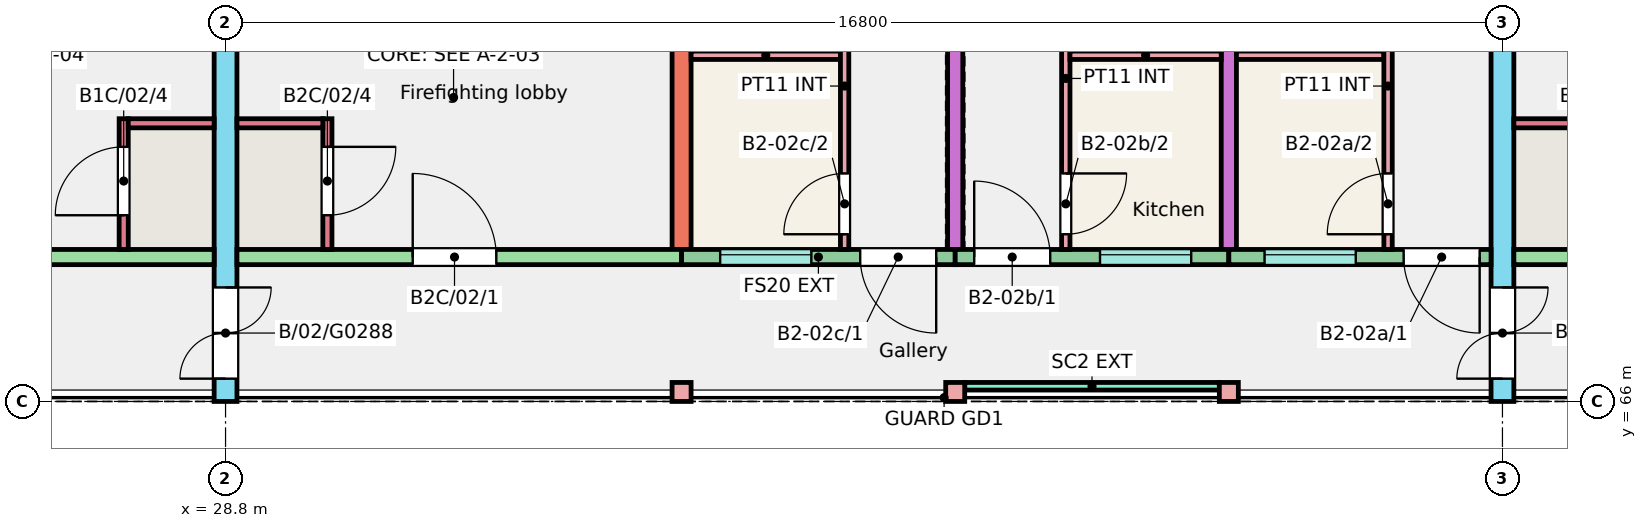
"""IFC4 building model, lengths in metres.
Left out: names, types, materials, properties, quantities, classifications, styles, units other than length and angle.
Written with IfcOpenShell. Run it as: python <this file> out.ifc"""

import sys

from ifc_helpers import new_model, si_unit, direction, frame, frame_2d, origin, origin_2d, place, context, subcontext, project, spatial, rectangle, extrude, element, fill, save


model = new_model("IFC4")
c1 = context("Model", 3, precision=1e-05, world=origin(), true_north=direction((0.0, 1.0)))
c2 = subcontext(c1, "Body", "Model", "MODEL_VIEW")
j1 = project(units=[si_unit("LENGTHUNIT", "METRE"), si_unit("PLANEANGLEUNIT", "RADIAN")], contexts=[c1])
p1 = place(None, origin())
s1 = spatial("IfcSite", under=j1, at=p1, CompositionType="ELEMENT")
p2 = place(p1, origin())
s2 = spatial("IfcBuilding", under=s1, at=p2, CompositionType="ELEMENT")
p3 = place(p2, frame((0.0, 0.0, 6.0)))
s3 = spatial("IfcBuildingStorey", under=s2, at=p3, CompositionType="ELEMENT", Elevation=6.0)
p4 = place(p3, frame((28.8, 66.0, 0.0), z_axis=(0.0, 0.0, 1.0), x_axis=(0.0, 1.0, 0.0)))
e1 = element("IfcWall", 1, at=p4, inside=s3, PredefinedType="SHEAR", context=c2, shape_type="SweptSolid", body=[
    extrude(rectangle(XDim=11.0, YDim=0.3, at=frame_2d((5.5, 0.0))), origin(), (0.0, 0.0, 1.0), 3.0),
])
p5 = place(p4, frame((0.3, 0.0, 0.0)))
e2 = element("IfcOpeningElement", 2, at=p5, cuts=e1, PredefinedType="OPENING", context=c2, shape_type="SweptSolid", body=[
    extrude(rectangle(XDim=1.2, YDim=2.1, at=frame_2d((0.6, 1.05))), frame((0.0, 0.16, 0.0), z_axis=(0.0, -1.0, 0.0), x_axis=(1.0, 0.0, 0.0)), (0.0, 0.0, 1.0), 0.32),
])
p6 = place(p3, frame((34.8, 68.0, 0.0), z_axis=(0.0, 0.0, 1.0), x_axis=(0.0, 1.0, 0.0)))
e3 = element("IfcWall", 3, at=p6, inside=s3, PredefinedType="SHEAR", context=c2, shape_type="SweptSolid", body=[
    extrude(rectangle(XDim=9.0, YDim=0.25, at=frame_2d((4.5, 0.0))), origin(), (0.0, 0.0, 1.0), 3.0),
])
for number, where, z_axis, x_axis in (
    (4, (38.4, 68.0, 0.0), (0.0, 0.0, 1.0), (0.0, 1.0, 0.0)),
    (5, (42.0, 68.0, 0.0), (0.0, 0.0, 1.0), (0.0, 1.0, 0.0)),
):
    element("IfcWall", number, at=place(p3, frame(where, z_axis=z_axis, x_axis=x_axis)), inside=s3, PredefinedType="SHEAR", context=c2, shape_type="SweptSolid", body=[
        extrude(rectangle(XDim=9.0, YDim=0.2, at=frame_2d((4.5, 0.0))), origin(), (0.0, 0.0, 1.0), 3.0),
    ])
p7 = place(p3, frame((45.6, 66.0, 0.0), z_axis=(0.0, 0.0, 1.0), x_axis=(0.0, 1.0, 0.0)))
e6 = element("IfcWall", 6, at=p7, inside=s3, PredefinedType="SHEAR", context=c2, shape_type="SweptSolid", body=[
    extrude(rectangle(XDim=11.0, YDim=0.3, at=frame_2d((5.5, 0.0))), origin(), (0.0, 0.0, 1.0), 3.0),
])
p8 = place(p7, frame((0.3, 0.0, 0.0)))
e7 = element("IfcOpeningElement", 7, at=p8, cuts=e6, PredefinedType="OPENING", context=c2, shape_type="SweptSolid", body=[
    extrude(rectangle(XDim=1.2, YDim=2.1, at=frame_2d((0.6, 1.05))), frame((0.0, 0.16, 0.0), z_axis=(0.0, -1.0, 0.0), x_axis=(1.0, 0.0, 0.0)), (0.0, 0.0, 1.0), 0.32),
])
p9 = place(p3, frame((22.8, 67.9, 0.0), z_axis=(0.0, 0.0, 1.0), x_axis=(1.0, 0.0, 0.0)))
e8 = element("IfcWall", 8, at=p9, inside=s3, PredefinedType="SHEAR", context=c2, shape_type="SweptSolid", body=[
    extrude(rectangle(XDim=5.85, YDim=0.2, at=frame_2d((2.925, 0.0))), origin(), (0.0, 0.0, 1.0), 3.0),
])
p10 = place(p9, frame((2.438, 0.0, 0.0)))
e9 = element("IfcOpeningElement", 9, at=p10, cuts=e8, PredefinedType="OPENING", context=c2, shape_type="SweptSolid", body=[
    extrude(rectangle(XDim=1.1, YDim=2.1, at=frame_2d((0.55, 1.05))), frame((0.0, 0.11, 0.0), z_axis=(0.0, -1.0, 0.0), x_axis=(1.0, 0.0, 0.0)), (0.0, 0.0, 1.0), 0.22),
])
p11 = place(p3, frame((27.46, 68.0, 0.0), z_axis=(0.0, 0.0, 1.0), x_axis=(0.0, 1.0, 0.0)))
e10 = element("IfcWall", 10, at=p11, inside=s3, PredefinedType="SHEAR", context=c2, shape_type="SweptSolid", body=[
    extrude(rectangle(XDim=1.72, YDim=0.12, at=frame_2d((0.86, 0.0))), origin(), (0.0, 0.0, 1.0), 3.0),
])
p12 = place(p11, frame((0.45, 0.0, 0.0)))
e11 = element("IfcOpeningElement", 11, at=p12, cuts=e10, PredefinedType="OPENING", context=c2, shape_type="SweptSolid", body=[
    extrude(rectangle(XDim=0.9, YDim=2.1, at=frame_2d((0.45, 1.05))), frame((0.0, 0.07, 0.0), z_axis=(0.0, -1.0, 0.0), x_axis=(1.0, 0.0, 0.0)), (0.0, 0.0, 1.0), 0.14),
])
p13 = place(p3, frame((27.52, 69.66, 0.0), z_axis=(0.0, 0.0, 1.0), x_axis=(1.0, 0.0, 0.0)))
e12 = element("IfcWall", 12, at=p13, inside=s3, PredefinedType="SHEAR", context=c2, shape_type="SweptSolid", body=[
    extrude(rectangle(XDim=1.13, YDim=0.12, at=frame_2d((0.565, 0.0))), origin(), (0.0, 0.0, 1.0), 3.0),
])
p14 = place(p3, frame((28.95, 67.9, 0.0), z_axis=(0.0, 0.0, 1.0), x_axis=(1.0, 0.0, 0.0)))
e13 = element("IfcWall", 13, at=p14, inside=s3, PredefinedType="SHEAR", context=c2, shape_type="SweptSolid", body=[
    extrude(rectangle(XDim=5.85, YDim=0.2, at=frame_2d((2.925, 0.0))), origin(), (0.0, 0.0, 1.0), 3.0),
])
p15 = place(p14, frame((2.312, 0.0, 0.0)))
e14 = element("IfcOpeningElement", 14, at=p15, cuts=e13, PredefinedType="OPENING", context=c2, shape_type="SweptSolid", body=[
    extrude(rectangle(XDim=1.1, YDim=2.1, at=frame_2d((0.55, 1.05))), frame((0.0, 0.11, 0.0), z_axis=(0.0, -1.0, 0.0), x_axis=(1.0, 0.0, 0.0)), (0.0, 0.0, 1.0), 0.22),
])
p16 = place(p3, frame((30.14, 68.0, 0.0), z_axis=(0.0, 0.0, 1.0), x_axis=(0.0, 1.0, 0.0)))
e15 = element("IfcWall", 15, at=p16, inside=s3, PredefinedType="SHEAR", context=c2, shape_type="SweptSolid", body=[
    extrude(rectangle(XDim=1.72, YDim=0.12, at=frame_2d((0.86, 0.0))), origin(), (0.0, 0.0, 1.0), 3.0),
])
p17 = place(p16, frame((0.45, 0.0, 0.0)))
e16 = element("IfcOpeningElement", 16, at=p17, cuts=e15, PredefinedType="OPENING", context=c2, shape_type="SweptSolid", body=[
    extrude(rectangle(XDim=0.9, YDim=2.1, at=frame_2d((0.45, 1.05))), frame((0.0, 0.07, 0.0), z_axis=(0.0, -1.0, 0.0), x_axis=(1.0, 0.0, 0.0)), (0.0, 0.0, 1.0), 0.14),
])
p18 = place(p3, frame((28.95, 69.66, 0.0), z_axis=(0.0, 0.0, 1.0), x_axis=(1.0, 0.0, 0.0)))
e17 = element("IfcWall", 17, at=p18, inside=s3, PredefinedType="SHEAR", context=c2, shape_type="SweptSolid", body=[
    extrude(rectangle(XDim=1.13, YDim=0.12, at=frame_2d((0.565, 0.0))), origin(), (0.0, 0.0, 1.0), 3.0),
])
p19 = place(p3, frame((34.8, 67.9, 0.0), z_axis=(0.0, 0.0, 1.0), x_axis=(1.0, 0.0, 0.0)))
e18 = element("IfcWall", 18, at=p19, inside=s3, PredefinedType="SOLIDWALL", context=c2, shape_type="SweptSolid", body=[
    extrude(rectangle(XDim=3.6, YDim=0.2, at=frame_2d((1.8, 0.0))), origin(), (0.0, 0.0, 1.0), 3.0),
])
p20 = place(p19, frame((0.508, 0.0, 1.1)))
e19 = element("IfcOpeningElement", 19, at=p20, cuts=e18, PredefinedType="OPENING", context=c2, shape_type="SweptSolid", body=[
    extrude(rectangle(XDim=1.2, YDim=1.3, at=frame_2d((0.6, 0.65))), frame((0.0, 0.11, 0.0), z_axis=(0.0, -1.0, 0.0), x_axis=(1.0, 0.0, 0.0)), (0.0, 0.0, 1.0), 0.22),
])
p21 = place(p19, frame((2.35, 0.0, 0.0)))
e20 = element("IfcOpeningElement", 20, at=p21, cuts=e18, PredefinedType="OPENING", context=c2, shape_type="SweptSolid", body=[
    extrude(rectangle(XDim=1.0, YDim=2.1, at=frame_2d((0.5, 1.05))), frame((0.0, 0.11, 0.0), z_axis=(0.0, -1.0, 0.0), x_axis=(1.0, 0.0, 0.0)), (0.0, 0.0, 1.0), 0.22),
])
p22 = place(p3, frame((38.4, 67.9, 0.0), z_axis=(0.0, 0.0, 1.0), x_axis=(1.0, 0.0, 0.0)))
e21 = element("IfcWall", 21, at=p22, inside=s3, PredefinedType="SOLIDWALL", context=c2, shape_type="SweptSolid", body=[
    extrude(rectangle(XDim=3.6, YDim=0.2, at=frame_2d((1.8, 0.0))), origin(), (0.0, 0.0, 1.0), 3.0),
])
p23 = place(p22, frame((1.905, 0.0, 1.1)))
e22 = element("IfcOpeningElement", 22, at=p23, cuts=e21, PredefinedType="OPENING", context=c2, shape_type="SweptSolid", body=[
    extrude(rectangle(XDim=1.2, YDim=1.3, at=frame_2d((0.6, 0.65))), frame((0.0, 0.11, 0.0), z_axis=(0.0, -1.0, 0.0), x_axis=(1.0, 0.0, 0.0)), (0.0, 0.0, 1.0), 0.22),
])
p24 = place(p22, frame((0.25, 0.0, 0.0)))
e23 = element("IfcOpeningElement", 23, at=p24, cuts=e21, PredefinedType="OPENING", context=c2, shape_type="SweptSolid", body=[
    extrude(rectangle(XDim=1.0, YDim=2.1, at=frame_2d((0.5, 1.05))), frame((0.0, 0.11, 0.0), z_axis=(0.0, -1.0, 0.0), x_axis=(1.0, 0.0, 0.0)), (0.0, 0.0, 1.0), 0.22),
])
p25 = place(p3, frame((42.0, 67.9, 0.0), z_axis=(0.0, 0.0, 1.0), x_axis=(1.0, 0.0, 0.0)))
e24 = element("IfcWall", 24, at=p25, inside=s3, PredefinedType="SOLIDWALL", context=c2, shape_type="SweptSolid", body=[
    extrude(rectangle(XDim=3.45, YDim=0.2, at=frame_2d((1.725, 0.0))), origin(), (0.0, 0.0, 1.0), 3.0),
])
p26 = place(p25, frame((0.47, 0.0, 1.1)))
e25 = element("IfcOpeningElement", 25, at=p26, cuts=e24, PredefinedType="OPENING", context=c2, shape_type="SweptSolid", body=[
    extrude(rectangle(XDim=1.2, YDim=1.3, at=frame_2d((0.6, 0.65))), frame((0.0, 0.11, 0.0), z_axis=(0.0, -1.0, 0.0), x_axis=(1.0, 0.0, 0.0)), (0.0, 0.0, 1.0), 0.22),
])
p27 = place(p25, frame((2.3, 0.0, 0.0)))
e26 = element("IfcOpeningElement", 26, at=p27, cuts=e24, PredefinedType="OPENING", context=c2, shape_type="SweptSolid", body=[
    extrude(rectangle(XDim=1.0, YDim=2.1, at=frame_2d((0.5, 1.05))), frame((0.0, 0.11, 0.0), z_axis=(0.0, -1.0, 0.0), x_axis=(1.0, 0.0, 0.0)), (0.0, 0.0, 1.0), 0.22),
])
p28 = place(p3, frame((45.75, 67.9, 0.0), z_axis=(0.0, 0.0, 1.0), x_axis=(1.0, 0.0, 0.0)))
e27 = element("IfcWall", 27, at=p28, inside=s3, PredefinedType="SHEAR", context=c2, shape_type="SweptSolid", body=[
    extrude(rectangle(XDim=5.85, YDim=0.2, at=frame_2d((2.925, 0.0))), origin(), (0.0, 0.0, 1.0), 3.0),
])
p29 = place(p28, frame((2.312, 0.0, 0.0)))
e28 = element("IfcOpeningElement", 28, at=p29, cuts=e27, PredefinedType="OPENING", context=c2, shape_type="SweptSolid", body=[
    extrude(rectangle(XDim=1.1, YDim=2.1, at=frame_2d((0.55, 1.05))), frame((0.0, 0.11, 0.0), z_axis=(0.0, -1.0, 0.0), x_axis=(1.0, 0.0, 0.0)), (0.0, 0.0, 1.0), 0.22),
])
p30 = place(p3, frame((45.75, 69.66, 0.0), z_axis=(0.0, 0.0, 1.0), x_axis=(1.0, 0.0, 0.0)))
e29 = element("IfcWall", 29, at=p30, inside=s3, PredefinedType="SHEAR", context=c2, shape_type="SweptSolid", body=[
    extrude(rectangle(XDim=1.13, YDim=0.12, at=frame_2d((0.565, 0.0))), origin(), (0.0, 0.0, 1.0), 3.0),
])
for number, where, z_axis, x_axis in (
    (30, (34.8, 66.125, 0.0), (0.0, 0.0, 1.0), (1.0, 0.0, 0.0)),
    (31, (38.4, 66.125, 0.0), (0.0, 0.0, 1.0), (1.0, 0.0, 0.0)),
    (32, (42.0, 66.125, 0.0), (0.0, 0.0, 1.0), (1.0, 0.0, 0.0)),
):
    element("IfcColumn", number, at=place(p3, frame(where, z_axis=z_axis, x_axis=x_axis)), inside=s3, PredefinedType="COLUMN", context=c2, shape_type="SweptSolid", body=[
        extrude(rectangle(XDim=0.25, YDim=0.25, at=origin_2d()), origin(), (0.0, 0.0, 1.0), 3.0),
    ])
p31 = place(p3, frame((38.525, 66.2, 0.0), z_axis=(0.0, 0.0, 1.0), x_axis=(1.0, 0.0, 0.0)))
e33 = element("IfcWall", 33, at=p31, inside=s3, PredefinedType="SOLIDWALL", context=c2, shape_type="SweptSolid", body=[
    extrude(rectangle(XDim=3.35, YDim=0.1, at=frame_2d((1.675, 0.0))), origin(), (0.0, 0.0, 1.0), 2.45),
])
p32 = place(p3, frame((42.1, 70.555, 0.0), z_axis=(0.0, 0.0, 1.0), x_axis=(1.0, 0.0, 0.0)))
e34 = element("IfcWall", 34, at=p32, inside=s3, PredefinedType="PARTITIONING", context=c2, shape_type="SweptSolid", body=[
    extrude(rectangle(XDim=1.94, YDim=0.11, at=frame_2d((0.97, 0.0))), origin(), (0.0, 0.0, 1.0), 2.8),
])
p33 = place(p3, frame((44.095, 68.0, 0.0), z_axis=(0.0, 0.0, 1.0), x_axis=(0.0, 1.0, 0.0)))
e35 = element("IfcWall", 35, at=p33, inside=s3, PredefinedType="PARTITIONING", context=c2, shape_type="SweptSolid", body=[
    extrude(rectangle(XDim=4.3, YDim=0.11, at=frame_2d((2.15, 0.0))), origin(), (0.0, 0.0, 1.0), 2.8),
])
p34 = place(p33, frame((0.2, 0.0, 0.0)))
e36 = element("IfcOpeningElement", 36, at=p34, cuts=e35, PredefinedType="OPENING", context=c2, shape_type="SweptSolid", body=[
    extrude(rectangle(XDim=0.8, YDim=2.1, at=frame_2d((0.4, 1.05))), frame((0.0, 0.065, 0.0), z_axis=(0.0, -1.0, 0.0), x_axis=(1.0, 0.0, 0.0)), (0.0, 0.0, 1.0), 0.13),
])
p35 = place(p33, frame((3.35, 0.0, 0.0)))
e37 = element("IfcOpeningElement", 37, at=p35, cuts=e35, PredefinedType="OPENING", context=c2, shape_type="SweptSolid", body=[
    extrude(rectangle(XDim=0.8, YDim=2.1, at=frame_2d((0.4, 1.05))), frame((0.0, 0.065, 0.0), z_axis=(0.0, -1.0, 0.0), x_axis=(1.0, 0.0, 0.0)), (0.0, 0.0, 1.0), 0.13),
])
p36 = place(p3, frame((39.855, 68.0, 0.0), z_axis=(0.0, 0.0, 1.0), x_axis=(0.0, 1.0, 0.0)))
e38 = element("IfcWall", 38, at=p36, inside=s3, PredefinedType="PARTITIONING", context=c2, shape_type="SweptSolid", body=[
    extrude(rectangle(XDim=4.5, YDim=0.11, at=frame_2d((2.25, 0.0))), origin(), (0.0, 0.0, 1.0), 2.8),
])
p37 = place(p36, frame((0.2, 0.0, 0.0)))
e39 = element("IfcOpeningElement", 39, at=p37, cuts=e38, PredefinedType="OPENING", context=c2, shape_type="SweptSolid", body=[
    extrude(rectangle(XDim=0.8, YDim=2.1, at=frame_2d((0.4, 1.05))), frame((0.0, 0.065, 0.0), z_axis=(0.0, -1.0, 0.0), x_axis=(1.0, 0.0, 0.0)), (0.0, 0.0, 1.0), 0.13),
])
p38 = place(p36, frame((3.55, 0.0, 0.0)))
e40 = element("IfcOpeningElement", 40, at=p38, cuts=e38, PredefinedType="OPENING", context=c2, shape_type="SweptSolid", body=[
    extrude(rectangle(XDim=0.8, YDim=2.1, at=frame_2d((0.4, 1.05))), frame((0.0, 0.065, 0.0), z_axis=(0.0, -1.0, 0.0), x_axis=(1.0, 0.0, 0.0)), (0.0, 0.0, 1.0), 0.13),
])
p39 = place(p3, frame((39.91, 70.555, 0.0), z_axis=(0.0, 0.0, 1.0), x_axis=(1.0, 0.0, 0.0)))
e41 = element("IfcWall", 41, at=p39, inside=s3, PredefinedType="PARTITIONING", context=c2, shape_type="SweptSolid", body=[
    extrude(rectangle(XDim=1.99, YDim=0.11, at=frame_2d((0.995, 0.0))), origin(), (0.0, 0.0, 1.0), 2.8),
])
p40 = place(p3, frame((34.925, 70.555, 0.0), z_axis=(0.0, 0.0, 1.0), x_axis=(1.0, 0.0, 0.0)))
e42 = element("IfcWall", 42, at=p40, inside=s3, PredefinedType="PARTITIONING", context=c2, shape_type="SweptSolid", body=[
    extrude(rectangle(XDim=1.965, YDim=0.11, at=frame_2d((0.982, 0.0))), origin(), (0.0, 0.0, 1.0), 2.8),
])
p41 = place(p3, frame((36.945, 68.0, 0.0), z_axis=(0.0, 0.0, 1.0), x_axis=(0.0, 1.0, 0.0)))
e43 = element("IfcWall", 43, at=p41, inside=s3, PredefinedType="PARTITIONING", context=c2, shape_type="SweptSolid", body=[
    extrude(rectangle(XDim=4.3, YDim=0.11, at=frame_2d((2.15, 0.0))), origin(), (0.0, 0.0, 1.0), 2.8),
])
p42 = place(p41, frame((0.2, 0.0, 0.0)))
e44 = element("IfcOpeningElement", 44, at=p42, cuts=e43, PredefinedType="OPENING", context=c2, shape_type="SweptSolid", body=[
    extrude(rectangle(XDim=0.8, YDim=2.1, at=frame_2d((0.4, 1.05))), frame((0.0, 0.065, 0.0), z_axis=(0.0, -1.0, 0.0), x_axis=(1.0, 0.0, 0.0)), (0.0, 0.0, 1.0), 0.13),
])
p43 = place(p41, frame((3.35, 0.0, 0.0)))
e45 = element("IfcOpeningElement", 45, at=p43, cuts=e43, PredefinedType="OPENING", context=c2, shape_type="SweptSolid", body=[
    extrude(rectangle(XDim=0.8, YDim=2.1, at=frame_2d((0.4, 1.05))), frame((0.0, 0.065, 0.0), z_axis=(0.0, -1.0, 0.0), x_axis=(1.0, 0.0, 0.0)), (0.0, 0.0, 1.0), 0.13),
])
p44 = place(p26, origin())
e46 = element("IfcWindow", 46, at=p44, inside=s3, PartitioningType="SINGLE_PANEL", PredefinedType="WINDOW", context=c2, shape_type="SweptSolid", body=[
    extrude(rectangle(XDim=1.2, YDim=1.3, at=frame_2d((0.6, 0.65))), frame((0.0, 0.06, 0.0), z_axis=(0.0, -1.0, 0.0), x_axis=(1.0, 0.0, 0.0)), (0.0, 0.0, 1.0), 0.06),
])
fill(e25, e46)
p45 = place(p23, origin())
e47 = element("IfcWindow", 47, at=p45, inside=s3, PartitioningType="SINGLE_PANEL", PredefinedType="WINDOW", context=c2, shape_type="SweptSolid", body=[
    extrude(rectangle(XDim=1.2, YDim=1.3, at=frame_2d((0.6, 0.65))), frame((0.0, 0.06, 0.0), z_axis=(0.0, -1.0, 0.0), x_axis=(1.0, 0.0, 0.0)), (0.0, 0.0, 1.0), 0.06),
])
fill(e22, e47)
p46 = place(p20, origin())
e48 = element("IfcWindow", 48, at=p46, inside=s3, PartitioningType="SINGLE_PANEL", PredefinedType="WINDOW", context=c2, shape_type="SweptSolid", body=[
    extrude(rectangle(XDim=1.2, YDim=1.3, at=frame_2d((0.6, 0.65))), frame((0.0, 0.06, 0.0), z_axis=(0.0, -1.0, 0.0), x_axis=(1.0, 0.0, 0.0)), (0.0, 0.0, 1.0), 0.06),
])
fill(e19, e48)
p47 = place(p27, origin())
e49 = element("IfcDoor", 49, at=p47, inside=s3, OperationType="SINGLE_SWING_RIGHT", PredefinedType="DOOR", context=c2, shape_type="SweptSolid", body=[
    extrude(rectangle(XDim=1.0, YDim=2.1, at=frame_2d((0.5, 1.05))), frame((0.0, 0.025, 0.0), z_axis=(0.0, -1.0, 0.0), x_axis=(1.0, 0.0, 0.0)), (0.0, 0.0, 1.0), 0.05),
])
fill(e26, e49)
p48 = place(p34, origin())
e50 = element("IfcDoor", 50, at=p48, inside=s3, OperationType="SINGLE_SWING_LEFT", PredefinedType="DOOR", context=c2, shape_type="SweptSolid", body=[
    extrude(rectangle(XDim=0.8, YDim=2.1, at=frame_2d((0.4, 1.05))), frame((0.0, 0.025, 0.0), z_axis=(0.0, -1.0, 0.0), x_axis=(1.0, 0.0, 0.0)), (0.0, 0.0, 1.0), 0.05),
])
fill(e36, e50)
p49 = place(p24, origin())
e51 = element("IfcDoor", 51, at=p49, inside=s3, OperationType="SINGLE_SWING_LEFT", PredefinedType="DOOR", context=c2, shape_type="SweptSolid", body=[
    extrude(rectangle(XDim=1.0, YDim=2.1, at=frame_2d((0.5, 1.05))), frame((0.0, 0.025, 0.0), z_axis=(0.0, -1.0, 0.0), x_axis=(1.0, 0.0, 0.0)), (0.0, 0.0, 1.0), 0.05),
])
fill(e23, e51)
p50 = place(p37, origin())
e52 = element("IfcDoor", 52, at=p50, inside=s3, OperationType="SINGLE_SWING_RIGHT", PredefinedType="DOOR", context=c2, shape_type="SweptSolid", body=[
    extrude(rectangle(XDim=0.8, YDim=2.1, at=frame_2d((0.4, 1.05))), frame((0.0, 0.025, 0.0), z_axis=(0.0, -1.0, 0.0), x_axis=(1.0, 0.0, 0.0)), (0.0, 0.0, 1.0), 0.05),
])
fill(e39, e52)
p51 = place(p21, origin())
e53 = element("IfcDoor", 53, at=p51, inside=s3, OperationType="SINGLE_SWING_RIGHT", PredefinedType="DOOR", context=c2, shape_type="SweptSolid", body=[
    extrude(rectangle(XDim=1.0, YDim=2.1, at=frame_2d((0.5, 1.05))), frame((0.0, 0.025, 0.0), z_axis=(0.0, -1.0, 0.0), x_axis=(1.0, 0.0, 0.0)), (0.0, 0.0, 1.0), 0.05),
])
fill(e20, e53)
p52 = place(p42, origin())
e54 = element("IfcDoor", 54, at=p52, inside=s3, OperationType="SINGLE_SWING_LEFT", PredefinedType="DOOR", context=c2, shape_type="SweptSolid", body=[
    extrude(rectangle(XDim=0.8, YDim=2.1, at=frame_2d((0.4, 1.05))), frame((0.0, 0.025, 0.0), z_axis=(0.0, -1.0, 0.0), x_axis=(1.0, 0.0, 0.0)), (0.0, 0.0, 1.0), 0.05),
])
fill(e44, e54)
p53 = place(p12, origin())
e55 = element("IfcDoor", 55, at=p53, inside=s3, OperationType="SINGLE_SWING_LEFT", PredefinedType="DOOR", context=c2, shape_type="SweptSolid", body=[
    extrude(rectangle(XDim=0.9, YDim=2.1, at=frame_2d((0.45, 1.05))), frame((0.0, 0.025, 0.0), z_axis=(0.0, -1.0, 0.0), x_axis=(1.0, 0.0, 0.0)), (0.0, 0.0, 1.0), 0.05),
])
fill(e11, e55)
p54 = place(p15, origin())
e56 = element("IfcDoor", 56, at=p54, inside=s3, OperationType="SINGLE_SWING_LEFT", PredefinedType="DOOR", context=c2, shape_type="SweptSolid", body=[
    extrude(rectangle(XDim=1.1, YDim=2.1, at=frame_2d((0.55, 1.05))), frame((0.0, 0.025, 0.0), z_axis=(0.0, -1.0, 0.0), x_axis=(1.0, 0.0, 0.0)), (0.0, 0.0, 1.0), 0.05),
])
fill(e14, e56)
p55 = place(p17, origin())
e57 = element("IfcDoor", 57, at=p55, inside=s3, OperationType="SINGLE_SWING_RIGHT", PredefinedType="DOOR", context=c2, shape_type="SweptSolid", body=[
    extrude(rectangle(XDim=0.9, YDim=2.1, at=frame_2d((0.45, 1.05))), frame((0.0, 0.025, 0.0), z_axis=(0.0, -1.0, 0.0), x_axis=(1.0, 0.0, 0.0)), (0.0, 0.0, 1.0), 0.05),
])
fill(e16, e57)
p56 = place(p5, origin())
e58 = element("IfcDoor", 58, at=p56, inside=s3, OperationType="DOUBLE_DOOR_SINGLE_SWING", PredefinedType="DOOR", context=c2, shape_type="SweptSolid", body=[
    extrude(rectangle(XDim=1.2, YDim=2.1, at=frame_2d((0.6, 1.05))), frame((0.0, 0.025, 0.0), z_axis=(0.0, -1.0, 0.0), x_axis=(1.0, 0.0, 0.0)), (0.0, 0.0, 1.0), 0.05),
])
fill(e2, e58)
p57 = place(p8, origin())
e59 = element("IfcDoor", 59, at=p57, inside=s3, OperationType="DOUBLE_DOOR_SINGLE_SWING", PredefinedType="DOOR", context=c2, shape_type="SweptSolid", body=[
    extrude(rectangle(XDim=1.2, YDim=2.1, at=frame_2d((0.6, 1.05))), frame((0.0, 0.025, 0.0), z_axis=(0.0, -1.0, 0.0), x_axis=(1.0, 0.0, 0.0)), (0.0, 0.0, 1.0), 0.05),
])
fill(e7, e59)
save(model, sys.argv[1])
